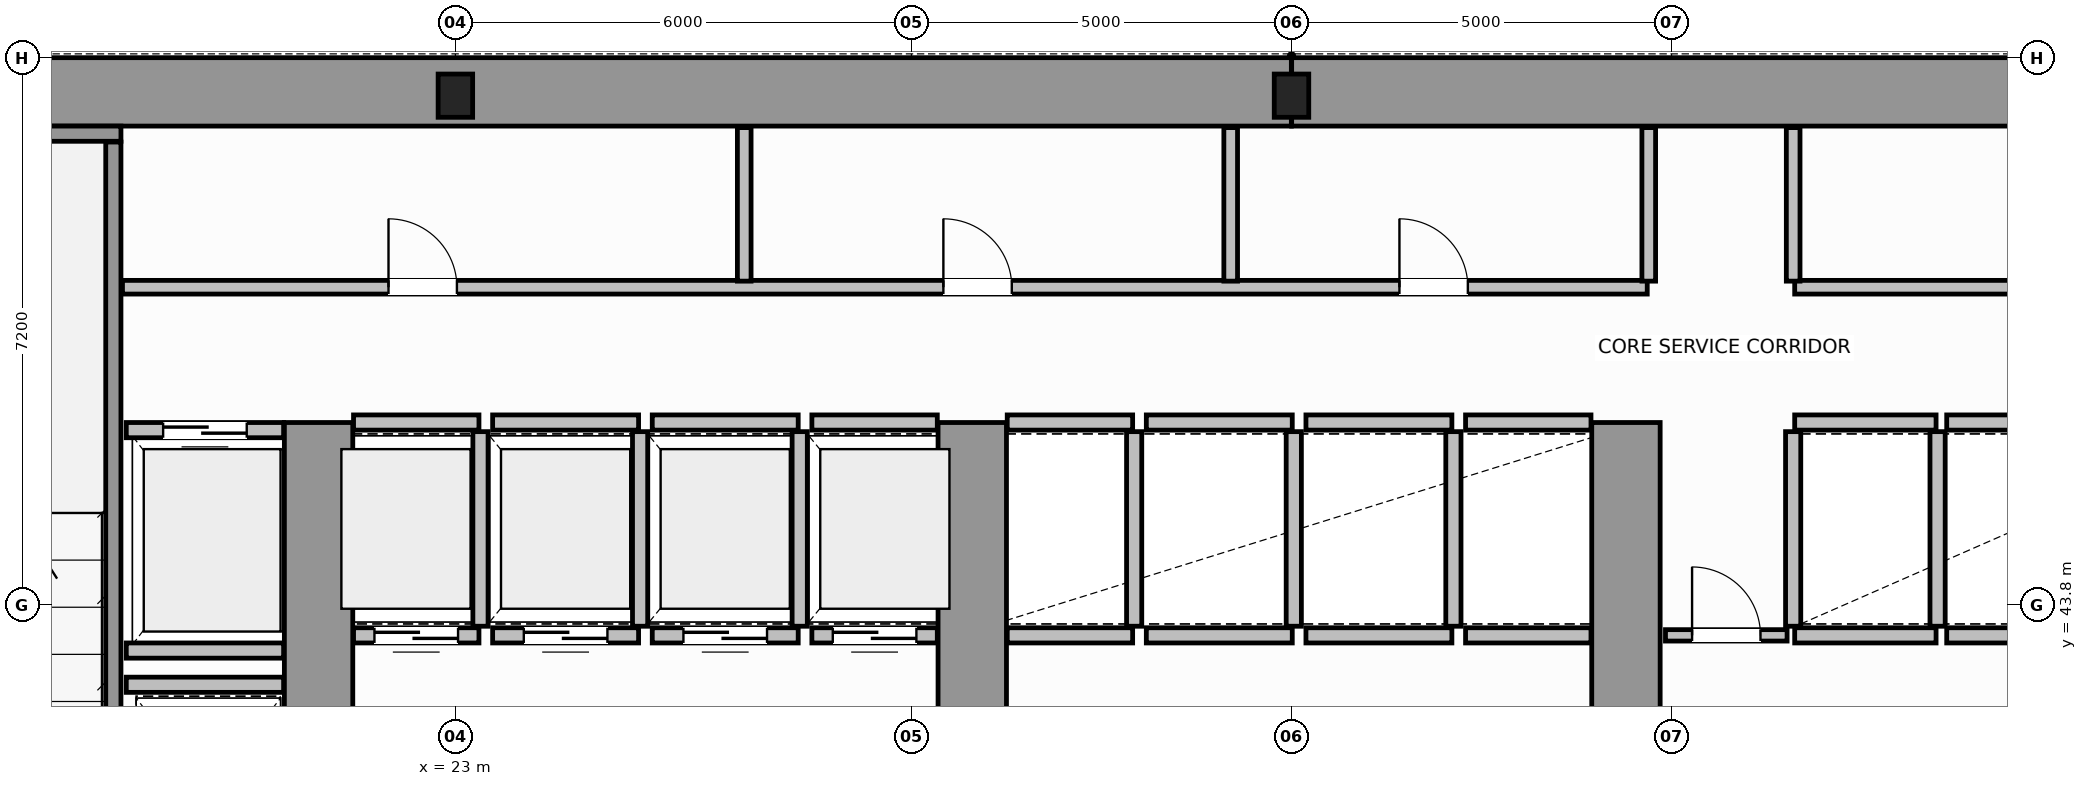
"""IFC4 building model, lengths in metres.
Left out: names, types, materials, properties, quantities, classifications, styles, units other than length and angle.
Written with IfcOpenShell. Run it as: python <this file> out.ifc"""

import sys

from ifc_helpers import new_model, si_unit, direction, frame, frame_2d, origin, origin_2d, place, context, subcontext, project, spatial, rectangle, i_section, extrude, source, transform, mapped, element, fill, save


model = new_model("IFC4")
c1 = context("Model", 3, precision=1e-05, world=origin(), true_north=direction((0.0, 1.0)))
c2 = subcontext(c1, "Body", "Model", "MODEL_VIEW")
j1 = project(units=[si_unit("LENGTHUNIT", "METRE"), si_unit("PLANEANGLEUNIT", "RADIAN")], contexts=[c1])
p1 = place(None, origin())
s1 = spatial("IfcSite", under=j1, at=p1, CompositionType="ELEMENT")
p2 = place(p1, origin())
s2 = spatial("IfcBuilding", under=s1, at=p2, CompositionType="ELEMENT")
p3 = place(p2, frame((0.0, 0.0, 26.4)))
s3 = spatial("IfcBuildingStorey", under=s2, at=p3, CompositionType="ELEMENT", Elevation=26.4)
m1 = source(origin(), c2, "Body", "SweptSolid", [
    extrude(i_section(OverallWidth=0.454, OverallDepth=0.569, WebThickness=0.078, FlangeThickness=0.08, FilletRadius=0.015, at=origin_2d()), origin(), (0.0, 0.0, 1.0), 3.8),
])
for number, where, z_axis, x_axis in (
    (1, (23.0, 50.5, 0.0), (0.0, 0.0, 1.0), (1.0, 0.0, 0.0)),
    (2, (34.0, 50.5, 0.0), (0.0, 0.0, 1.0), (1.0, 0.0, 0.0)),
):
    element("IfcColumn", number, at=place(p3, frame(where, z_axis=z_axis, x_axis=x_axis)), inside=s3, PredefinedType="COLUMN", context=c2, shape_type="MappedRepresentation", body=[
        mapped(m1, transform((0.0, 0.0, 0.0), scale=1.0)),
    ])
for number, where, z_axis, x_axis in (
    (3, (14.454, 50.55, 0.0), (0.0, 0.0, 1.0), (1.0, 0.0, 0.0)),
    (4, (34.002, 50.55, 0.0), (0.0, 0.0, 1.0), (1.0, 0.0, 0.0)),
):
    element("IfcWall", number, at=place(p3, frame(where, z_axis=z_axis, x_axis=x_axis)), inside=s3, PredefinedType="SHEAR", context=c2, shape_type="SweptSolid", body=[
        extrude(rectangle(XDim=19.544, YDim=0.9, at=frame_2d((9.772, 0.0))), origin(), (0.0, 0.0, 1.0), 3.8),
    ])
for number, where, z_axis, x_axis in (
    (5, (21.2, 36.97, 0.0), (0.0, 0.0, 1.0), (0.0, 1.0, 0.0)),
    (6, (29.8, 36.97, 0.0), (0.0, 0.0, 1.0), (0.0, 1.0, 0.0)),
    (7, (38.4, 36.97, 0.0), (0.0, 0.0, 1.0), (0.0, 1.0, 0.0)),
):
    element("IfcWall", number, at=place(p3, frame(where, z_axis=z_axis, x_axis=x_axis)), inside=s3, PredefinedType="SHEAR", context=c2, shape_type="SweptSolid", body=[
        extrude(rectangle(XDim=9.23, YDim=0.9, at=frame_2d((4.615, 0.0))), origin(), (0.0, 0.0, 1.0), 3.8),
    ])
p4 = place(p3, frame((14.45, 50.0, 0.0), z_axis=(0.0, 0.0, 1.0), x_axis=(1.0, 0.0, 0.0)))
e8 = element("IfcWall", 8, at=p4, inside=s3, PredefinedType="SOLIDWALL", context=c2, shape_type="SweptSolid", body=[
    extrude(rectangle(XDim=4.15, YDim=0.2, at=frame_2d((2.075, 0.0))), origin(), (0.0, 0.0, 1.0), 3.8),
])
p5 = place(p3, frame((18.5, 39.96, 0.0), z_axis=(0.0, 0.0, 1.0), x_axis=(0.0, 1.0, 0.0)))
e9 = element("IfcWall", 9, at=p5, inside=s3, PredefinedType="SOLIDWALL", context=c2, shape_type="SweptSolid", body=[
    extrude(rectangle(XDim=9.93, YDim=0.2, at=frame_2d((4.965, 0.0))), origin(), (0.0, 0.0, 1.0), 3.8),
])
p6 = place(p3, frame((21.66, 43.4, 0.0), z_axis=(0.0, 0.0, 1.0), x_axis=(1.0, 0.0, 0.0)))
e10 = element("IfcWall", 10, at=p6, inside=s3, PredefinedType="SOLIDWALL", context=c2, shape_type="SweptSolid", body=[
    extrude(rectangle(XDim=1.65, YDim=0.2, at=frame_2d((0.825, 0.0))), origin(), (0.0, 0.0, 1.0), 3.58),
])
p7 = place(p6, frame((0.275, 0.0, 0.0)))
e11 = element("IfcOpeningElement", 11, at=p7, cuts=e10, PredefinedType="OPENING", context=c2, shape_type="SweptSolid", body=[
    extrude(rectangle(XDim=1.1, YDim=2.15, at=frame_2d((0.55, 1.075))), frame((0.0, 0.11, 0.0), z_axis=(0.0, -1.0, 0.0), x_axis=(1.0, 0.0, 0.0)), (0.0, 0.0, 1.0), 0.22),
])
p8 = place(p3, frame((21.66, 46.2, 0.0), z_axis=(0.0, 0.0, 1.0), x_axis=(1.0, 0.0, 0.0)))
e12 = element("IfcWall", 12, at=p8, inside=s3, PredefinedType="SOLIDWALL", context=c2, shape_type="SweptSolid", body=[
    extrude(rectangle(XDim=1.65, YDim=0.2, at=frame_2d((0.825, 0.0))), origin(), (0.0, 0.0, 1.0), 3.58),
])
p9 = place(p3, frame((23.33, 43.52, 0.0), z_axis=(0.0, 0.0, 1.0), x_axis=(0.0, 1.0, 0.0)))
e13 = element("IfcWall", 13, at=p9, inside=s3, PredefinedType="SOLIDWALL", context=c2, shape_type="SweptSolid", body=[
    extrude(rectangle(XDim=2.56, YDim=0.2, at=frame_2d((1.28, 0.0))), origin(), (0.0, 0.0, 1.0), 3.58),
])
p10 = place(p3, frame((23.49, 43.4, 0.0), z_axis=(0.0, 0.0, 1.0), x_axis=(1.0, 0.0, 0.0)))
e14 = element("IfcWall", 14, at=p10, inside=s3, PredefinedType="SOLIDWALL", context=c2, shape_type="SweptSolid", body=[
    extrude(rectangle(XDim=1.92, YDim=0.2, at=frame_2d((0.96, 0.0))), origin(), (0.0, 0.0, 1.0), 3.58),
])
p11 = place(p10, frame((0.41, 0.0, 0.0)))
e15 = element("IfcOpeningElement", 15, at=p11, cuts=e14, PredefinedType="OPENING", context=c2, shape_type="SweptSolid", body=[
    extrude(rectangle(XDim=1.1, YDim=2.15, at=frame_2d((0.55, 1.075))), frame((0.0, 0.11, 0.0), z_axis=(0.0, -1.0, 0.0), x_axis=(1.0, 0.0, 0.0)), (0.0, 0.0, 1.0), 0.22),
])
p12 = place(p3, frame((23.49, 46.2, 0.0), z_axis=(0.0, 0.0, 1.0), x_axis=(1.0, 0.0, 0.0)))
e16 = element("IfcWall", 16, at=p12, inside=s3, PredefinedType="SOLIDWALL", context=c2, shape_type="SweptSolid", body=[
    extrude(rectangle(XDim=1.92, YDim=0.2, at=frame_2d((0.96, 0.0))), origin(), (0.0, 0.0, 1.0), 3.58),
])
p13 = place(p3, frame((25.43, 43.52, 0.0), z_axis=(0.0, 0.0, 1.0), x_axis=(0.0, 1.0, 0.0)))
e17 = element("IfcWall", 17, at=p13, inside=s3, PredefinedType="SOLIDWALL", context=c2, shape_type="SweptSolid", body=[
    extrude(rectangle(XDim=2.56, YDim=0.2, at=frame_2d((1.28, 0.0))), origin(), (0.0, 0.0, 1.0), 3.58),
])
p14 = place(p3, frame((25.59, 43.4, 0.0), z_axis=(0.0, 0.0, 1.0), x_axis=(1.0, 0.0, 0.0)))
e18 = element("IfcWall", 18, at=p14, inside=s3, PredefinedType="SOLIDWALL", context=c2, shape_type="SweptSolid", body=[
    extrude(rectangle(XDim=1.92, YDim=0.2, at=frame_2d((0.96, 0.0))), origin(), (0.0, 0.0, 1.0), 3.58),
])
p15 = place(p14, frame((0.41, 0.0, 0.0)))
e19 = element("IfcOpeningElement", 19, at=p15, cuts=e18, PredefinedType="OPENING", context=c2, shape_type="SweptSolid", body=[
    extrude(rectangle(XDim=1.1, YDim=2.15, at=frame_2d((0.55, 1.075))), frame((0.0, 0.11, 0.0), z_axis=(0.0, -1.0, 0.0), x_axis=(1.0, 0.0, 0.0)), (0.0, 0.0, 1.0), 0.22),
])
p16 = place(p3, frame((25.59, 46.2, 0.0), z_axis=(0.0, 0.0, 1.0), x_axis=(1.0, 0.0, 0.0)))
e20 = element("IfcWall", 20, at=p16, inside=s3, PredefinedType="SOLIDWALL", context=c2, shape_type="SweptSolid", body=[
    extrude(rectangle(XDim=1.92, YDim=0.2, at=frame_2d((0.96, 0.0))), origin(), (0.0, 0.0, 1.0), 3.58),
])
p17 = place(p3, frame((27.53, 43.52, 0.0), z_axis=(0.0, 0.0, 1.0), x_axis=(0.0, 1.0, 0.0)))
e21 = element("IfcWall", 21, at=p17, inside=s3, PredefinedType="SOLIDWALL", context=c2, shape_type="SweptSolid", body=[
    extrude(rectangle(XDim=2.56, YDim=0.2, at=frame_2d((1.28, 0.0))), origin(), (0.0, 0.0, 1.0), 3.58),
])
p18 = place(p3, frame((27.69, 43.4, 0.0), z_axis=(0.0, 0.0, 1.0), x_axis=(1.0, 0.0, 0.0)))
e22 = element("IfcWall", 22, at=p18, inside=s3, PredefinedType="SOLIDWALL", context=c2, shape_type="SweptSolid", body=[
    extrude(rectangle(XDim=1.65, YDim=0.2, at=frame_2d((0.825, 0.0))), origin(), (0.0, 0.0, 1.0), 3.58),
])
p19 = place(p18, frame((0.275, 0.0, 0.0)))
e23 = element("IfcOpeningElement", 23, at=p19, cuts=e22, PredefinedType="OPENING", context=c2, shape_type="SweptSolid", body=[
    extrude(rectangle(XDim=1.1, YDim=2.15, at=frame_2d((0.55, 1.075))), frame((0.0, 0.11, 0.0), z_axis=(0.0, -1.0, 0.0), x_axis=(1.0, 0.0, 0.0)), (0.0, 0.0, 1.0), 0.22),
])
p20 = place(p3, frame((27.69, 46.2, 0.0), z_axis=(0.0, 0.0, 1.0), x_axis=(1.0, 0.0, 0.0)))
e24 = element("IfcWall", 24, at=p20, inside=s3, PredefinedType="SOLIDWALL", context=c2, shape_type="SweptSolid", body=[
    extrude(rectangle(XDim=1.65, YDim=0.2, at=frame_2d((0.825, 0.0))), origin(), (0.0, 0.0, 1.0), 3.58),
])
for number, where, z_axis, x_axis in (
    (25, (30.26, 43.4, 0.0), (0.0, 0.0, 1.0), (1.0, 0.0, 0.0)),
    (26, (30.26, 46.2, 0.0), (0.0, 0.0, 1.0), (1.0, 0.0, 0.0)),
):
    element("IfcWall", number, at=place(p3, frame(where, z_axis=z_axis, x_axis=x_axis)), inside=s3, PredefinedType="SOLIDWALL", context=c2, shape_type="SweptSolid", body=[
        extrude(rectangle(XDim=1.65, YDim=0.2, at=frame_2d((0.825, 0.0))), origin(), (0.0, 0.0, 1.0), 3.58),
    ])
p21 = place(p3, frame((31.93, 43.52, 0.0), z_axis=(0.0, 0.0, 1.0), x_axis=(0.0, 1.0, 0.0)))
e27 = element("IfcWall", 27, at=p21, inside=s3, PredefinedType="SOLIDWALL", context=c2, shape_type="SweptSolid", body=[
    extrude(rectangle(XDim=2.56, YDim=0.2, at=frame_2d((1.28, 0.0))), origin(), (0.0, 0.0, 1.0), 3.58),
])
for number, where, z_axis, x_axis in (
    (28, (32.09, 43.4, 0.0), (0.0, 0.0, 1.0), (1.0, 0.0, 0.0)),
    (29, (32.09, 46.2, 0.0), (0.0, 0.0, 1.0), (1.0, 0.0, 0.0)),
):
    element("IfcWall", number, at=place(p3, frame(where, z_axis=z_axis, x_axis=x_axis)), inside=s3, PredefinedType="SOLIDWALL", context=c2, shape_type="SweptSolid", body=[
        extrude(rectangle(XDim=1.92, YDim=0.2, at=frame_2d((0.96, 0.0))), origin(), (0.0, 0.0, 1.0), 3.58),
    ])
p22 = place(p3, frame((34.03, 43.52, 0.0), z_axis=(0.0, 0.0, 1.0), x_axis=(0.0, 1.0, 0.0)))
e30 = element("IfcWall", 30, at=p22, inside=s3, PredefinedType="SOLIDWALL", context=c2, shape_type="SweptSolid", body=[
    extrude(rectangle(XDim=2.56, YDim=0.2, at=frame_2d((1.28, 0.0))), origin(), (0.0, 0.0, 1.0), 3.58),
])
for number, where, z_axis, x_axis in (
    (31, (34.19, 43.4, 0.0), (0.0, 0.0, 1.0), (1.0, 0.0, 0.0)),
    (32, (34.19, 46.2, 0.0), (0.0, 0.0, 1.0), (1.0, 0.0, 0.0)),
):
    element("IfcWall", number, at=place(p3, frame(where, z_axis=z_axis, x_axis=x_axis)), inside=s3, PredefinedType="SOLIDWALL", context=c2, shape_type="SweptSolid", body=[
        extrude(rectangle(XDim=1.92, YDim=0.2, at=frame_2d((0.96, 0.0))), origin(), (0.0, 0.0, 1.0), 3.58),
    ])
p23 = place(p3, frame((36.13, 43.52, 0.0), z_axis=(0.0, 0.0, 1.0), x_axis=(0.0, 1.0, 0.0)))
e33 = element("IfcWall", 33, at=p23, inside=s3, PredefinedType="SOLIDWALL", context=c2, shape_type="SweptSolid", body=[
    extrude(rectangle(XDim=2.56, YDim=0.2, at=frame_2d((1.28, 0.0))), origin(), (0.0, 0.0, 1.0), 3.58),
])
for number, where, z_axis, x_axis in (
    (34, (36.29, 43.4, 0.0), (0.0, 0.0, 1.0), (1.0, 0.0, 0.0)),
    (35, (36.29, 46.2, 0.0), (0.0, 0.0, 1.0), (1.0, 0.0, 0.0)),
):
    element("IfcWall", number, at=place(p3, frame(where, z_axis=z_axis, x_axis=x_axis)), inside=s3, PredefinedType="SOLIDWALL", context=c2, shape_type="SweptSolid", body=[
        extrude(rectangle(XDim=1.65, YDim=0.2, at=frame_2d((0.825, 0.0))), origin(), (0.0, 0.0, 1.0), 3.58),
    ])
for number, where, z_axis, x_axis in (
    (36, (40.62, 43.4, 0.0), (0.0, 0.0, 1.0), (1.0, 0.0, 0.0)),
    (37, (40.62, 46.2, 0.0), (0.0, 0.0, 1.0), (1.0, 0.0, 0.0)),
):
    element("IfcWall", number, at=place(p3, frame(where, z_axis=z_axis, x_axis=x_axis)), inside=s3, PredefinedType="SOLIDWALL", context=c2, shape_type="SweptSolid", body=[
        extrude(rectangle(XDim=1.86, YDim=0.2, at=frame_2d((0.93, 0.0))), origin(), (0.0, 0.0, 1.0), 3.58),
    ])
for number, where, z_axis, x_axis in (
    (38, (40.6, 43.52, 0.0), (0.0, 0.0, 1.0), (0.0, 1.0, 0.0)),
    (39, (42.5, 43.52, 0.0), (0.0, 0.0, 1.0), (0.0, 1.0, 0.0)),
):
    element("IfcWall", number, at=place(p3, frame(where, z_axis=z_axis, x_axis=x_axis)), inside=s3, PredefinedType="SOLIDWALL", context=c2, shape_type="SweptSolid", body=[
        extrude(rectangle(XDim=2.56, YDim=0.2, at=frame_2d((1.28, 0.0))), origin(), (0.0, 0.0, 1.0), 3.58),
    ])
for number, where, z_axis, x_axis in (
    (40, (42.62, 43.4, 0.0), (0.0, 0.0, 1.0), (1.0, 0.0, 0.0)),
    (41, (42.62, 46.2, 0.0), (0.0, 0.0, 1.0), (1.0, 0.0, 0.0)),
):
    element("IfcWall", number, at=place(p3, frame(where, z_axis=z_axis, x_axis=x_axis)), inside=s3, PredefinedType="SOLIDWALL", context=c2, shape_type="SweptSolid", body=[
        extrude(rectangle(XDim=1.86, YDim=0.2, at=frame_2d((0.93, 0.0))), origin(), (0.0, 0.0, 1.0), 3.58),
    ])
p24 = place(p3, frame((18.67, 46.1, 0.0), z_axis=(0.0, 0.0, 1.0), x_axis=(1.0, 0.0, 0.0)))
e42 = element("IfcWall", 42, at=p24, inside=s3, PredefinedType="SOLIDWALL", context=c2, shape_type="SweptSolid", body=[
    extrude(rectangle(XDim=2.07, YDim=0.2, at=frame_2d((1.035, 0.0))), origin(), (0.0, 0.0, 1.0), 3.58),
])
p25 = place(p24, frame((0.485, 0.0, 0.0)))
e43 = element("IfcOpeningElement", 43, at=p25, cuts=e42, PredefinedType="OPENING", context=c2, shape_type="SweptSolid", body=[
    extrude(rectangle(XDim=1.1, YDim=2.15, at=frame_2d((0.55, 1.075))), frame((0.0, 0.11, 0.0), z_axis=(0.0, -1.0, 0.0), x_axis=(1.0, 0.0, 0.0)), (0.0, 0.0, 1.0), 0.22),
])
for number, where, z_axis, x_axis in (
    (44, (18.67, 43.2, 0.0), (0.0, 0.0, 1.0), (1.0, 0.0, 0.0)),
    (45, (18.67, 42.75, 0.0), (0.0, 0.0, 1.0), (1.0, 0.0, 0.0)),
):
    element("IfcWall", number, at=place(p3, frame(where, z_axis=z_axis, x_axis=x_axis)), inside=s3, PredefinedType="SOLIDWALL", context=c2, shape_type="SweptSolid", body=[
        extrude(rectangle(XDim=2.07, YDim=0.2, at=frame_2d((1.035, 0.0))), origin(), (0.0, 0.0, 1.0), 3.58),
    ])
p26 = place(p3, frame((38.92, 43.4, 0.0), z_axis=(0.0, 0.0, 1.0), x_axis=(1.0, 0.0, 0.0)))
e46 = element("IfcWall", 46, at=p26, inside=s3, PredefinedType="PARTITIONING", context=c2, shape_type="SweptSolid", body=[
    extrude(rectangle(XDim=1.6, YDim=0.15, at=frame_2d((0.8, 0.0))), origin(), (0.0, 0.0, 1.0), 3.58),
])
p27 = place(p26, frame((0.35, 0.0, 0.0)))
e47 = element("IfcOpeningElement", 47, at=p27, cuts=e46, PredefinedType="OPENING", context=c2, shape_type="SweptSolid", body=[
    extrude(rectangle(XDim=0.9, YDim=2.1, at=frame_2d((0.45, 1.05))), frame((0.0, 0.085, 0.0), z_axis=(0.0, -1.0, 0.0), x_axis=(1.0, 0.0, 0.0)), (0.0, 0.0, 1.0), 0.17),
])
p28 = place(p3, frame((18.62, 47.98, 0.0), z_axis=(0.0, 0.0, 1.0), x_axis=(1.0, 0.0, 0.0)))
e48 = element("IfcWall", 48, at=p28, inside=s3, PredefinedType="PLUMBINGWALL", context=c2, shape_type="SweptSolid", body=[
    extrude(rectangle(XDim=20.06, YDim=0.18, at=frame_2d((10.03, 0.0))), origin(), (0.0, 0.0, 1.0), 3.58),
])
p29 = place(p28, frame((3.5, 0.0, 0.0)))
e49 = element("IfcOpeningElement", 49, at=p29, cuts=e48, PredefinedType="OPENING", context=c2, shape_type="SweptSolid", body=[
    extrude(rectangle(XDim=0.9, YDim=2.15, at=frame_2d((0.45, 1.075))), frame((0.0, 0.1, 0.0), z_axis=(0.0, -1.0, 0.0), x_axis=(1.0, 0.0, 0.0)), (0.0, 0.0, 1.0), 0.2),
])
p30 = place(p28, frame((10.8, 0.0, 0.0)))
e50 = element("IfcOpeningElement", 50, at=p30, cuts=e48, PredefinedType="OPENING", context=c2, shape_type="SweptSolid", body=[
    extrude(rectangle(XDim=0.9, YDim=2.15, at=frame_2d((0.45, 1.075))), frame((0.0, 0.1, 0.0), z_axis=(0.0, -1.0, 0.0), x_axis=(1.0, 0.0, 0.0)), (0.0, 0.0, 1.0), 0.2),
])
p31 = place(p28, frame((16.8, 0.0, 0.0)))
e51 = element("IfcOpeningElement", 51, at=p31, cuts=e48, PredefinedType="OPENING", context=c2, shape_type="SweptSolid", body=[
    extrude(rectangle(XDim=0.9, YDim=2.15, at=frame_2d((0.45, 1.075))), frame((0.0, 0.1, 0.0), z_axis=(0.0, -1.0, 0.0), x_axis=(1.0, 0.0, 0.0)), (0.0, 0.0, 1.0), 0.2),
])
p32 = place(p3, frame((40.62, 47.98, 0.0), z_axis=(0.0, 0.0, 1.0), x_axis=(1.0, 0.0, 0.0)))
e52 = element("IfcWall", 52, at=p32, inside=s3, PredefinedType="PLUMBINGWALL", context=c2, shape_type="SweptSolid", body=[
    extrude(rectangle(XDim=8.76, YDim=0.18, at=frame_2d((4.38, 0.0))), origin(), (0.0, 0.0, 1.0), 3.58),
])
p33 = place(p32, frame((3.8, 0.0, 0.0)))
e53 = element("IfcOpeningElement", 53, at=p33, cuts=e52, PredefinedType="OPENING", context=c2, shape_type="SweptSolid", body=[
    extrude(rectangle(XDim=0.9, YDim=2.15, at=frame_2d((0.45, 1.075))), frame((0.0, 0.1, 0.0), z_axis=(0.0, -1.0, 0.0), x_axis=(1.0, 0.0, 0.0)), (0.0, 0.0, 1.0), 0.2),
])
for number, where, z_axis, x_axis in (
    (54, (26.8, 48.06, 0.0), (0.0, 0.0, 1.0), (0.0, 1.0, 0.0)),
    (55, (33.2, 48.06, 0.0), (0.0, 0.0, 1.0), (0.0, 1.0, 0.0)),
    (56, (38.7, 48.06, 0.0), (0.0, 0.0, 1.0), (0.0, 1.0, 0.0)),
    (57, (40.6, 48.06, 0.0), (0.0, 0.0, 1.0), (0.0, 1.0, 0.0)),
):
    element("IfcWall", number, at=place(p3, frame(where, z_axis=z_axis, x_axis=x_axis)), inside=s3, PredefinedType="PLUMBINGWALL", context=c2, shape_type="SweptSolid", body=[
        extrude(rectangle(XDim=2.02, YDim=0.18, at=frame_2d((1.01, 0.0))), origin(), (0.0, 0.0, 1.0), 3.58),
    ])
m2 = source(origin(), c2, "Body", "SweptSolid", [
    extrude(rectangle(XDim=1.1, YDim=2.15, at=frame_2d((0.55, 1.075))), frame((0.0, 0.025, 0.0), z_axis=(0.0, -1.0, 0.0), x_axis=(1.0, 0.0, 0.0)), (0.0, 0.0, 1.0), 0.05),
])
p34 = place(p7, origin())
e58 = element("IfcDoor", 58, at=p34, inside=s3, OperationType="DOUBLE_DOOR_SLIDING", PredefinedType="DOOR", context=c2, shape_type="MappedRepresentation", body=[
    mapped(m2, transform((0.0, 0.0, 0.0), scale=1.0)),
])
fill(e11, e58)
p35 = place(p11, origin())
e59 = element("IfcDoor", 59, at=p35, inside=s3, OperationType="DOUBLE_DOOR_SLIDING", PredefinedType="DOOR", context=c2, shape_type="MappedRepresentation", body=[
    mapped(m2, transform((0.0, 0.0, 0.0), scale=1.0)),
])
fill(e15, e59)
p36 = place(p15, origin())
e60 = element("IfcDoor", 60, at=p36, inside=s3, OperationType="DOUBLE_DOOR_SLIDING", PredefinedType="DOOR", context=c2, shape_type="MappedRepresentation", body=[
    mapped(m2, transform((0.0, 0.0, 0.0), scale=1.0)),
])
fill(e19, e60)
p37 = place(p19, origin())
e61 = element("IfcDoor", 61, at=p37, inside=s3, OperationType="DOUBLE_DOOR_SLIDING", PredefinedType="DOOR", context=c2, shape_type="MappedRepresentation", body=[
    mapped(m2, transform((0.0, 0.0, 0.0), scale=1.0)),
])
fill(e23, e61)
p38 = place(p25, origin())
e62 = element("IfcDoor", 62, at=p38, inside=s3, OperationType="DOUBLE_DOOR_SLIDING", PredefinedType="DOOR", context=c2, shape_type="MappedRepresentation", body=[
    mapped(m2, transform((0.0, 0.0, 0.0), scale=1.0)),
])
fill(e43, e62)
m3 = source(origin(), c2, "Body", "SweptSolid", [
    extrude(rectangle(XDim=0.9, YDim=2.1, at=frame_2d((0.45, 1.05))), frame((0.0, 0.025, 0.0), z_axis=(0.0, -1.0, 0.0), x_axis=(1.0, 0.0, 0.0)), (0.0, 0.0, 1.0), 0.05),
])
p39 = place(p27, origin())
e63 = element("IfcDoor", 63, at=p39, inside=s3, OperationType="SINGLE_SWING_LEFT", PredefinedType="DOOR", context=c2, shape_type="MappedRepresentation", body=[
    mapped(m3, transform((0.0, 0.0, 0.0), scale=1.0)),
])
fill(e47, e63)
m4 = source(origin(), c2, "Body", "SweptSolid", [
    extrude(rectangle(XDim=0.9, YDim=2.15, at=frame_2d((0.45, 1.075))), frame((0.0, 0.025, 0.0), z_axis=(0.0, -1.0, 0.0), x_axis=(1.0, 0.0, 0.0)), (0.0, 0.0, 1.0), 0.05),
])
p40 = place(p29, origin())
e64 = element("IfcDoor", 64, at=p40, inside=s3, OperationType="SINGLE_SWING_LEFT", PredefinedType="DOOR", context=c2, shape_type="MappedRepresentation", body=[
    mapped(m4, transform((0.0, 0.0, 0.0), scale=1.0)),
])
fill(e49, e64)
p41 = place(p30, origin())
e65 = element("IfcDoor", 65, at=p41, inside=s3, OperationType="SINGLE_SWING_RIGHT", PredefinedType="DOOR", context=c2, shape_type="MappedRepresentation", body=[
    mapped(m4, transform((0.0, 0.0, 0.0), scale=1.0)),
])
fill(e50, e65)
p42 = place(p31, origin())
e66 = element("IfcDoor", 66, at=p42, inside=s3, OperationType="SINGLE_SWING_LEFT", PredefinedType="DOOR", context=c2, shape_type="MappedRepresentation", body=[
    mapped(m4, transform((0.0, 0.0, 0.0), scale=1.0)),
])
fill(e51, e66)
save(model, sys.argv[1])
